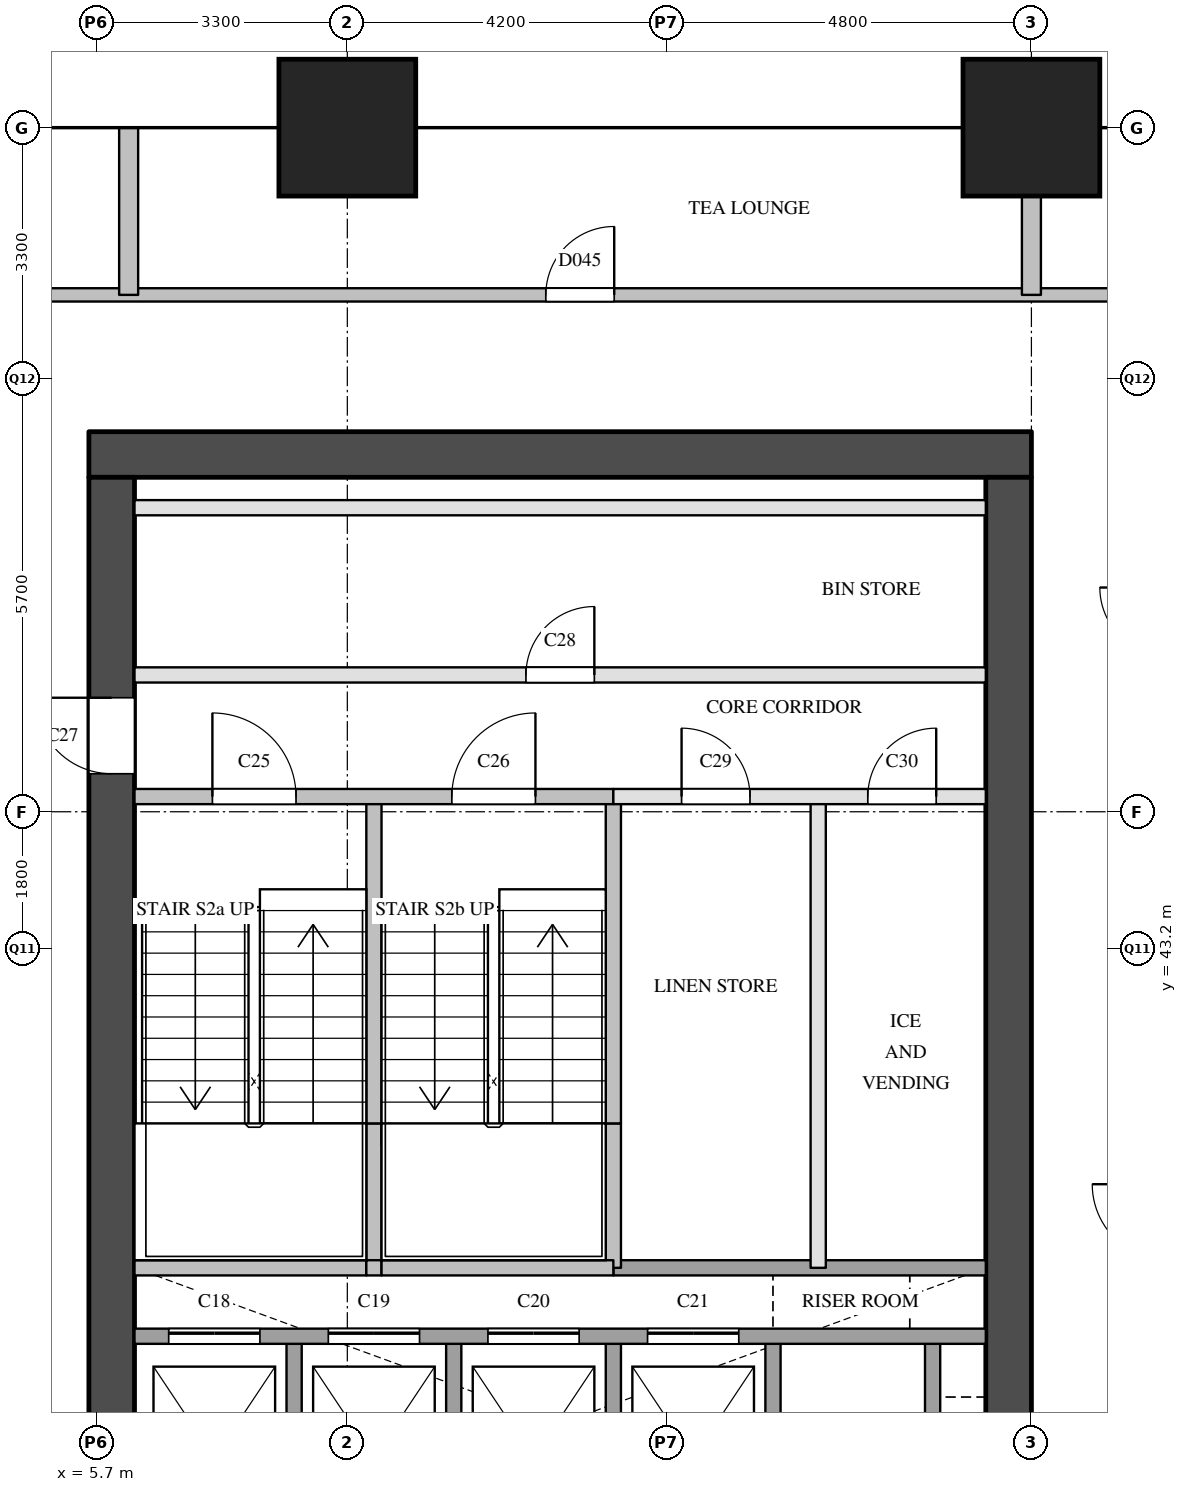
"""IFC4 building model, lengths in metres.
Left out: names, types, materials, properties, quantities, classifications, styles, units other than length and angle.
Written with IfcOpenShell. Run it as: python <this file> out.ifc"""

import sys

from ifc_helpers import new_model, si_unit, direction, frame, frame_2d, origin, origin_2d, place, context, subcontext, project, spatial, rectangle, extrude, element, fill, save


model = new_model("IFC4")
c1 = context("Model", 3, precision=1e-05, world=origin(), true_north=direction((0.0, 1.0)))
c2 = subcontext(c1, "Body", "Model", "MODEL_VIEW")
j1 = project(units=[si_unit("LENGTHUNIT", "METRE"), si_unit("PLANEANGLEUNIT", "RADIAN")], contexts=[c1])
p1 = place(None, origin())
s1 = spatial("IfcSite", under=j1, at=p1, CompositionType="ELEMENT")
p2 = place(p1, origin())
s2 = spatial("IfcBuilding", under=s1, at=p2, CompositionType="ELEMENT")
p3 = place(p2, frame((0.0, 0.0, 57.6)))
s3 = spatial("IfcBuildingStorey", under=s2, at=p3, CompositionType="ELEMENT", Elevation=57.6)
for number, where, z_axis, x_axis in (
    (1, (9.0, 54.0, 0.0), (0.0, 0.0, 1.0), (1.0, 0.0, 0.0)),
    (2, (18.0, 54.0, 0.0), (0.0, 0.0, 1.0), (1.0, 0.0, 0.0)),
):
    element("IfcColumn", number, at=place(p3, frame(where, z_axis=z_axis, x_axis=x_axis)), inside=s3, PredefinedType="COLUMN", context=c2, shape_type="SweptSolid", body=[
        extrude(rectangle(XDim=1.8, YDim=1.8, at=origin_2d()), origin(), (0.0, 0.0, 1.0), 3.8),
    ])
p4 = place(p3, frame((5.6, 49.7, 0.0), z_axis=(0.0, 0.0, 1.0), x_axis=(1.0, 0.0, 0.0)))
e3 = element("IfcWall", 3, at=p4, inside=s3, PredefinedType="SHEAR", context=c2, shape_type="SweptSolid", body=[
    extrude(rectangle(XDim=12.4, YDim=0.6, at=frame_2d((6.2, 0.0))), origin(), (0.0, 0.0, 1.0), 3.5),
])
p5 = place(p3, frame((5.9, 29.1, 0.0), z_axis=(0.0, 0.0, 1.0), x_axis=(0.0, 1.0, 0.0)))
e4 = element("IfcWall", 4, at=p5, inside=s3, PredefinedType="SHEAR", context=c2, shape_type="SweptSolid", body=[
    extrude(rectangle(XDim=20.3, YDim=0.6, at=frame_2d((10.15, 0.0))), origin(), (0.0, 0.0, 1.0), 3.5),
])
p6 = place(p5, frame((3.6, 0.0, 0.0)))
e5 = element("IfcOpeningElement", 5, at=p6, cuts=e4, PredefinedType="OPENING", context=c2, shape_type="SweptSolid", body=[
    extrude(rectangle(XDim=1.8, YDim=2.1, at=frame_2d((0.9, 1.05))), frame((0.0, 0.31, 0.0), z_axis=(0.0, -1.0, 0.0), x_axis=(1.0, 0.0, 0.0)), (0.0, 0.0, 1.0), 0.62),
])
p7 = place(p5, frame((16.4, 0.0, 0.0)))
e6 = element("IfcOpeningElement", 6, at=p7, cuts=e4, PredefinedType="OPENING", context=c2, shape_type="SweptSolid", body=[
    extrude(rectangle(XDim=1.0, YDim=2.1, at=frame_2d((0.5, 1.05))), frame((0.0, 0.31, 0.0), z_axis=(0.0, -1.0, 0.0), x_axis=(1.0, 0.0, 0.0)), (0.0, 0.0, 1.0), 0.62),
])
p8 = place(p3, frame((17.7, 29.1, 0.0), z_axis=(0.0, 0.0, 1.0), x_axis=(0.0, 1.0, 0.0)))
e7 = element("IfcWall", 7, at=p8, inside=s3, PredefinedType="SHEAR", context=c2, shape_type="SweptSolid", body=[
    extrude(rectangle(XDim=20.3, YDim=0.6, at=frame_2d((10.15, 0.0))), origin(), (0.0, 0.0, 1.0), 3.5),
])
p9 = place(p8, frame((1.25, 0.0, 0.0)))
e8 = element("IfcOpeningElement", 8, at=p9, cuts=e7, PredefinedType="OPENING", context=c2, shape_type="SweptSolid", body=[
    extrude(rectangle(XDim=0.7, YDim=2.1, at=frame_2d((0.35, 1.05))), frame((0.0, 0.31, 0.0), z_axis=(0.0, -1.0, 0.0), x_axis=(1.0, 0.0, 0.0)), (0.0, 0.0, 1.0), 0.62),
])
p10 = place(p8, frame((7.05, 0.0, 0.0)))
e9 = element("IfcOpeningElement", 9, at=p10, cuts=e7, PredefinedType="OPENING", context=c2, shape_type="SweptSolid", body=[
    extrude(rectangle(XDim=0.7, YDim=2.1, at=frame_2d((0.35, 1.05))), frame((0.0, 0.31, 0.0), z_axis=(0.0, -1.0, 0.0), x_axis=(1.0, 0.0, 0.0)), (0.0, 0.0, 1.0), 0.62),
])
p11 = place(p3, frame((8.3, 34.9, 0.0), z_axis=(0.0, 0.0, 1.0), x_axis=(0.0, 1.0, 0.0)))
e10 = element("IfcWall", 10, at=p11, inside=s3, PredefinedType="SOLIDWALL", context=c2, shape_type="SweptSolid", body=[
    extrude(rectangle(XDim=3.2, YDim=0.2, at=frame_2d((1.6, 0.0))), origin(), (0.0, 0.0, 1.0), 3.5),
])
p12 = place(p3, frame((9.35, 39.0, 0.0), z_axis=(0.0, 0.0, 1.0), x_axis=(0.0, 1.0, 0.0)))
e11 = element("IfcWall", 11, at=p12, inside=s3, PredefinedType="SOLIDWALL", context=c2, shape_type="SweptSolid", body=[
    extrude(rectangle(XDim=1.9, YDim=0.2, at=frame_2d((0.95, 0.0))), origin(), (0.0, 0.0, 1.0), 3.5),
])
p13 = place(p3, frame((9.35, 40.9, 0.0), z_axis=(0.0, 0.0, 1.0), x_axis=(0.0, 1.0, 0.0)))
e12 = element("IfcWall", 12, at=p13, inside=s3, PredefinedType="SOLIDWALL", context=c2, shape_type="SweptSolid", body=[
    extrude(rectangle(XDim=4.3, YDim=0.2, at=frame_2d((2.15, 0.0))), origin(), (0.0, 0.0, 1.0), 3.5),
])
for number, where, z_axis, x_axis in (
    (13, (10.4, 34.9, 0.0), (0.0, 0.0, 1.0), (0.0, 1.0, 0.0)),
    (14, (12.5, 34.9, 0.0), (0.0, 0.0, 1.0), (0.0, 1.0, 0.0)),
):
    element("IfcWall", number, at=place(p3, frame(where, z_axis=z_axis, x_axis=x_axis)), inside=s3, PredefinedType="SOLIDWALL", context=c2, shape_type="SweptSolid", body=[
        extrude(rectangle(XDim=3.2, YDim=0.2, at=frame_2d((1.6, 0.0))), origin(), (0.0, 0.0, 1.0), 3.5),
    ])
p14 = place(p3, frame((12.5, 39.0, 0.0), z_axis=(0.0, 0.0, 1.0), x_axis=(0.0, 1.0, 0.0)))
e15 = element("IfcWall", 15, at=p14, inside=s3, PredefinedType="SOLIDWALL", context=c2, shape_type="SweptSolid", body=[
    extrude(rectangle(XDim=1.9, YDim=0.2, at=frame_2d((0.95, 0.0))), origin(), (0.0, 0.0, 1.0), 3.5),
])
p15 = place(p3, frame((12.5, 40.9, 0.0), z_axis=(0.0, 0.0, 1.0), x_axis=(0.0, 1.0, 0.0)))
e16 = element("IfcWall", 16, at=p15, inside=s3, PredefinedType="SOLIDWALL", context=c2, shape_type="SweptSolid", body=[
    extrude(rectangle(XDim=4.3, YDim=0.2, at=frame_2d((2.15, 0.0))), origin(), (0.0, 0.0, 1.0), 3.5),
])
p16 = place(p3, frame((14.6, 34.9, 0.0), z_axis=(0.0, 0.0, 1.0), x_axis=(0.0, 1.0, 0.0)))
e17 = element("IfcWall", 17, at=p16, inside=s3, PredefinedType="SOLIDWALL", context=c2, shape_type="SweptSolid", body=[
    extrude(rectangle(XDim=3.2, YDim=0.2, at=frame_2d((1.6, 0.0))), origin(), (0.0, 0.0, 1.0), 3.5),
])
p17 = place(p3, frame((15.195, 39.0, 0.0), z_axis=(0.0, 0.0, 1.0), x_axis=(0.0, 1.0, 0.0)))
e18 = element("IfcWall", 18, at=p17, inside=s3, PredefinedType="PARTITIONING", context=c2, shape_type="SweptSolid", body=[
    extrude(rectangle(XDim=6.2, YDim=0.2, at=frame_2d((3.1, 0.0))), origin(), (0.0, 0.0, 1.0), 3.5),
])
p18 = place(p3, frame((16.7, 34.9, 0.0), z_axis=(0.0, 0.0, 1.0), x_axis=(0.0, 1.0, 0.0)))
e19 = element("IfcWall", 19, at=p18, inside=s3, PredefinedType="SOLIDWALL", context=c2, shape_type="SweptSolid", body=[
    extrude(rectangle(XDim=3.2, YDim=0.2, at=frame_2d((1.6, 0.0))), origin(), (0.0, 0.0, 1.0), 3.5),
])
p19 = place(p3, frame((6.2, 38.1, 0.0), z_axis=(0.0, 0.0, 1.0), x_axis=(1.0, 0.0, 0.0)))
e20 = element("IfcWall", 20, at=p19, inside=s3, PredefinedType="SOLIDWALL", context=c2, shape_type="SweptSolid", body=[
    extrude(rectangle(XDim=11.2, YDim=0.2, at=frame_2d((5.6, 0.0))), origin(), (0.0, 0.0, 1.0), 3.5),
])
p20 = place(p19, frame((0.45, 0.0, 0.0)))
e21 = element("IfcOpeningElement", 21, at=p20, cuts=e20, PredefinedType="OPENING", context=c2, shape_type="SweptSolid", body=[
    extrude(rectangle(XDim=1.2, YDim=2.1, at=frame_2d((0.6, 1.05))), frame((0.0, 0.11, 0.0), z_axis=(0.0, -1.0, 0.0), x_axis=(1.0, 0.0, 0.0)), (0.0, 0.0, 1.0), 0.22),
])
p21 = place(p19, frame((2.55, 0.0, 0.0)))
e22 = element("IfcOpeningElement", 22, at=p21, cuts=e20, PredefinedType="OPENING", context=c2, shape_type="SweptSolid", body=[
    extrude(rectangle(XDim=1.2, YDim=2.1, at=frame_2d((0.6, 1.05))), frame((0.0, 0.11, 0.0), z_axis=(0.0, -1.0, 0.0), x_axis=(1.0, 0.0, 0.0)), (0.0, 0.0, 1.0), 0.22),
])
p22 = place(p19, frame((4.65, 0.0, 0.0)))
e23 = element("IfcOpeningElement", 23, at=p22, cuts=e20, PredefinedType="OPENING", context=c2, shape_type="SweptSolid", body=[
    extrude(rectangle(XDim=1.2, YDim=2.1, at=frame_2d((0.6, 1.05))), frame((0.0, 0.11, 0.0), z_axis=(0.0, -1.0, 0.0), x_axis=(1.0, 0.0, 0.0)), (0.0, 0.0, 1.0), 0.22),
])
p23 = place(p19, frame((6.75, 0.0, 0.0)))
e24 = element("IfcOpeningElement", 24, at=p23, cuts=e20, PredefinedType="OPENING", context=c2, shape_type="SweptSolid", body=[
    extrude(rectangle(XDim=1.2, YDim=2.1, at=frame_2d((0.6, 1.05))), frame((0.0, 0.11, 0.0), z_axis=(0.0, -1.0, 0.0), x_axis=(1.0, 0.0, 0.0)), (0.0, 0.0, 1.0), 0.22),
])
p24 = place(p3, frame((12.5, 39.0, 0.0), z_axis=(0.0, 0.0, 1.0), x_axis=(1.0, 0.0, 0.0)))
e25 = element("IfcWall", 25, at=p24, inside=s3, PredefinedType="SOLIDWALL", context=c2, shape_type="SweptSolid", body=[
    extrude(rectangle(XDim=4.9, YDim=0.2, at=frame_2d((2.45, 0.0))), origin(), (0.0, 0.0, 1.0), 3.5),
])
p25 = place(p3, frame((6.2, 39.0, 0.0), z_axis=(0.0, 0.0, 1.0), x_axis=(1.0, 0.0, 0.0)))
e26 = element("IfcWall", 26, at=p25, inside=s3, PredefinedType="SOLIDWALL", context=c2, shape_type="SweptSolid", body=[
    extrude(rectangle(XDim=3.05, YDim=0.2, at=frame_2d((1.525, 0.0))), origin(), (0.0, 0.0, 1.0), 3.5),
])
p26 = place(p3, frame((9.25, 39.0, 0.0), z_axis=(0.0, 0.0, 1.0), x_axis=(1.0, 0.0, 0.0)))
e27 = element("IfcWall", 27, at=p26, inside=s3, PredefinedType="SOLIDWALL", context=c2, shape_type="SweptSolid", body=[
    extrude(rectangle(XDim=0.2, YDim=0.2, at=frame_2d((0.1, 0.0))), origin(), (0.0, 0.0, 1.0), 3.5),
])
p27 = place(p3, frame((9.45, 39.0, 0.0), z_axis=(0.0, 0.0, 1.0), x_axis=(1.0, 0.0, 0.0)))
e28 = element("IfcWall", 28, at=p27, inside=s3, PredefinedType="SOLIDWALL", context=c2, shape_type="SweptSolid", body=[
    extrude(rectangle(XDim=3.05, YDim=0.2, at=frame_2d((1.525, 0.0))), origin(), (0.0, 0.0, 1.0), 3.5),
])
p28 = place(p3, frame((12.5, 45.2, 0.0), z_axis=(0.0, 0.0, 1.0), x_axis=(1.0, 0.0, 0.0)))
e29 = element("IfcWall", 29, at=p28, inside=s3, PredefinedType="PARTITIONING", context=c2, shape_type="SweptSolid", body=[
    extrude(rectangle(XDim=4.9, YDim=0.2, at=frame_2d((2.45, 0.0))), origin(), (0.0, 0.0, 1.0), 3.5),
])
p29 = place(p28, frame((0.897, 0.0, 0.0)))
e30 = element("IfcOpeningElement", 30, at=p29, cuts=e29, PredefinedType="OPENING", context=c2, shape_type="SweptSolid", body=[
    extrude(rectangle(XDim=0.9, YDim=2.1, at=frame_2d((0.45, 1.05))), frame((0.0, 0.11, 0.0), z_axis=(0.0, -1.0, 0.0), x_axis=(1.0, 0.0, 0.0)), (0.0, 0.0, 1.0), 0.22),
])
p30 = place(p28, frame((3.347, 0.0, 0.0)))
e31 = element("IfcOpeningElement", 31, at=p30, cuts=e29, PredefinedType="OPENING", context=c2, shape_type="SweptSolid", body=[
    extrude(rectangle(XDim=0.9, YDim=2.1, at=frame_2d((0.45, 1.05))), frame((0.0, 0.11, 0.0), z_axis=(0.0, -1.0, 0.0), x_axis=(1.0, 0.0, 0.0)), (0.0, 0.0, 1.0), 0.22),
])
p31 = place(p3, frame((6.2, 45.2, 0.0), z_axis=(0.0, 0.0, 1.0), x_axis=(1.0, 0.0, 0.0)))
e32 = element("IfcWall", 32, at=p31, inside=s3, PredefinedType="SOLIDWALL", context=c2, shape_type="SweptSolid", body=[
    extrude(rectangle(XDim=6.3, YDim=0.2, at=frame_2d((3.15, 0.0))), origin(), (0.0, 0.0, 1.0), 3.5),
])
p32 = place(p31, frame((1.025, 0.0, 0.0)))
e33 = element("IfcOpeningElement", 33, at=p32, cuts=e32, PredefinedType="OPENING", context=c2, shape_type="SweptSolid", body=[
    extrude(rectangle(XDim=1.1, YDim=2.1, at=frame_2d((0.55, 1.05))), frame((0.0, 0.11, 0.0), z_axis=(0.0, -1.0, 0.0), x_axis=(1.0, 0.0, 0.0)), (0.0, 0.0, 1.0), 0.22),
])
p33 = place(p31, frame((4.175, 0.0, 0.0)))
e34 = element("IfcOpeningElement", 34, at=p33, cuts=e32, PredefinedType="OPENING", context=c2, shape_type="SweptSolid", body=[
    extrude(rectangle(XDim=1.1, YDim=2.1, at=frame_2d((0.55, 1.05))), frame((0.0, 0.11, 0.0), z_axis=(0.0, -1.0, 0.0), x_axis=(1.0, 0.0, 0.0)), (0.0, 0.0, 1.0), 0.22),
])
p34 = place(p3, frame((6.2, 46.8, 0.0), z_axis=(0.0, 0.0, 1.0), x_axis=(1.0, 0.0, 0.0)))
e35 = element("IfcWall", 35, at=p34, inside=s3, PredefinedType="PARTITIONING", context=c2, shape_type="SweptSolid", body=[
    extrude(rectangle(XDim=11.2, YDim=0.2, at=frame_2d((5.6, 0.0))), origin(), (0.0, 0.0, 1.0), 3.5),
])
p35 = place(p34, frame((5.15, 0.0, 0.0)))
e36 = element("IfcOpeningElement", 36, at=p35, cuts=e35, PredefinedType="OPENING", context=c2, shape_type="SweptSolid", body=[
    extrude(rectangle(XDim=0.9, YDim=2.1, at=frame_2d((0.45, 1.05))), frame((0.0, 0.11, 0.0), z_axis=(0.0, -1.0, 0.0), x_axis=(1.0, 0.0, 0.0)), (0.0, 0.0, 1.0), 0.22),
])
p36 = place(p3, frame((6.2, 49.0, 0.0), z_axis=(0.0, 0.0, 1.0), x_axis=(1.0, 0.0, 0.0)))
e37 = element("IfcWall", 37, at=p36, inside=s3, PredefinedType="PARTITIONING", context=c2, shape_type="SweptSolid", body=[
    extrude(rectangle(XDim=11.2, YDim=0.2, at=frame_2d((5.6, 0.0))), origin(), (0.0, 0.0, 1.0), 3.5),
])
p37 = place(p3, frame((3.8, 51.8, 0.0), z_axis=(0.0, 0.0, 1.0), x_axis=(1.0, 0.0, 0.0)))
e38 = element("IfcWall", 38, at=p37, inside=s3, PredefinedType="PARTITIONING", context=c2, shape_type="SweptSolid", body=[
    extrude(rectangle(XDim=16.0, YDim=0.175, at=frame_2d((8.0, 0.0))), origin(), (0.0, 0.0, 1.0), 3.5),
])
p38 = place(p37, frame((7.811, 0.0, 0.0)))
e39 = element("IfcOpeningElement", 39, at=p38, cuts=e38, PredefinedType="OPENING", context=c2, shape_type="SweptSolid", body=[
    extrude(rectangle(XDim=0.9, YDim=2.1, at=frame_2d((0.45, 1.05))), frame((0.0, 0.097, 0.0), z_axis=(0.0, -1.0, 0.0), x_axis=(1.0, 0.0, 0.0)), (0.0, 0.0, 1.0), 0.195),
])
p39 = place(p3, frame((6.123, 51.8, 0.0), z_axis=(0.0, 0.0, 1.0), x_axis=(0.0, 1.0, 0.0)))
e40 = element("IfcWall", 40, at=p39, inside=s3, PredefinedType="PARTITIONING", context=c2, shape_type="SweptSolid", body=[
    extrude(rectangle(XDim=2.2, YDim=0.25, at=frame_2d((1.1, 0.0))), origin(), (0.0, 0.0, 1.0), 2.5),
])
p40 = place(p3, frame((18.0, 51.8, 0.0), z_axis=(0.0, 0.0, 1.0), x_axis=(0.0, 1.0, 0.0)))
e41 = element("IfcWall", 41, at=p40, inside=s3, PredefinedType="PARTITIONING", context=c2, shape_type="SweptSolid", body=[
    extrude(rectangle(XDim=2.2, YDim=0.25, at=frame_2d((1.1, 0.0))), origin(), (0.0, 0.0, 1.0), 3.5),
])
p41 = place(p20, origin())
e42 = element("IfcDoor", 42, at=p41, inside=s3, OperationType="SLIDING_TO_LEFT", PredefinedType="DOOR", context=c2, shape_type="SweptSolid", body=[
    extrude(rectangle(XDim=1.2, YDim=2.1, at=frame_2d((0.6, 1.05))), frame((0.0, 0.025, 0.0), z_axis=(0.0, -1.0, 0.0), x_axis=(1.0, 0.0, 0.0)), (0.0, 0.0, 1.0), 0.05),
])
fill(e21, e42)
p42 = place(p21, origin())
e43 = element("IfcDoor", 43, at=p42, inside=s3, OperationType="SLIDING_TO_LEFT", PredefinedType="DOOR", context=c2, shape_type="SweptSolid", body=[
    extrude(rectangle(XDim=1.2, YDim=2.1, at=frame_2d((0.6, 1.05))), frame((0.0, 0.025, 0.0), z_axis=(0.0, -1.0, 0.0), x_axis=(1.0, 0.0, 0.0)), (0.0, 0.0, 1.0), 0.05),
])
fill(e22, e43)
p43 = place(p22, origin())
e44 = element("IfcDoor", 44, at=p43, inside=s3, OperationType="SLIDING_TO_LEFT", PredefinedType="DOOR", context=c2, shape_type="SweptSolid", body=[
    extrude(rectangle(XDim=1.2, YDim=2.1, at=frame_2d((0.6, 1.05))), frame((0.0, 0.025, 0.0), z_axis=(0.0, -1.0, 0.0), x_axis=(1.0, 0.0, 0.0)), (0.0, 0.0, 1.0), 0.05),
])
fill(e23, e44)
p44 = place(p23, origin())
e45 = element("IfcDoor", 45, at=p44, inside=s3, OperationType="SLIDING_TO_LEFT", PredefinedType="DOOR", context=c2, shape_type="SweptSolid", body=[
    extrude(rectangle(XDim=1.2, YDim=2.1, at=frame_2d((0.6, 1.05))), frame((0.0, 0.025, 0.0), z_axis=(0.0, -1.0, 0.0), x_axis=(1.0, 0.0, 0.0)), (0.0, 0.0, 1.0), 0.05),
])
fill(e24, e45)
p45 = place(p32, origin())
e46 = element("IfcDoor", 46, at=p45, inside=s3, OperationType="SINGLE_SWING_LEFT", PredefinedType="DOOR", context=c2, shape_type="SweptSolid", body=[
    extrude(rectangle(XDim=1.1, YDim=2.1, at=frame_2d((0.55, 1.05))), frame((0.0, 0.025, 0.0), z_axis=(0.0, -1.0, 0.0), x_axis=(1.0, 0.0, 0.0)), (0.0, 0.0, 1.0), 0.05),
])
fill(e33, e46)
p46 = place(p33, origin())
e47 = element("IfcDoor", 47, at=p46, inside=s3, OperationType="SINGLE_SWING_RIGHT", PredefinedType="DOOR", context=c2, shape_type="SweptSolid", body=[
    extrude(rectangle(XDim=1.1, YDim=2.1, at=frame_2d((0.55, 1.05))), frame((0.0, 0.025, 0.0), z_axis=(0.0, -1.0, 0.0), x_axis=(1.0, 0.0, 0.0)), (0.0, 0.0, 1.0), 0.05),
])
fill(e34, e47)
p47 = place(p7, origin())
e48 = element("IfcDoor", 48, at=p47, inside=s3, OperationType="SINGLE_SWING_RIGHT", PredefinedType="DOOR", context=c2, shape_type="SweptSolid", body=[
    extrude(rectangle(XDim=1.0, YDim=2.1, at=frame_2d((0.5, 1.05))), frame((0.0, 0.025, 0.0), z_axis=(0.0, -1.0, 0.0), x_axis=(1.0, 0.0, 0.0)), (0.0, 0.0, 1.0), 0.05),
])
fill(e6, e48)
p48 = place(p35, origin())
e49 = element("IfcDoor", 49, at=p48, inside=s3, OperationType="SINGLE_SWING_RIGHT", PredefinedType="DOOR", context=c2, shape_type="SweptSolid", body=[
    extrude(rectangle(XDim=0.9, YDim=2.1, at=frame_2d((0.45, 1.05))), frame((0.0, 0.025, 0.0), z_axis=(0.0, -1.0, 0.0), x_axis=(1.0, 0.0, 0.0)), (0.0, 0.0, 1.0), 0.05),
])
fill(e36, e49)
p49 = place(p29, origin())
e50 = element("IfcDoor", 50, at=p49, inside=s3, OperationType="SINGLE_SWING_LEFT", PredefinedType="DOOR", context=c2, shape_type="SweptSolid", body=[
    extrude(rectangle(XDim=0.9, YDim=2.1, at=frame_2d((0.45, 1.05))), frame((0.0, 0.025, 0.0), z_axis=(0.0, -1.0, 0.0), x_axis=(1.0, 0.0, 0.0)), (0.0, 0.0, 1.0), 0.05),
])
fill(e30, e50)
p50 = place(p30, origin())
e51 = element("IfcDoor", 51, at=p50, inside=s3, OperationType="SINGLE_SWING_RIGHT", PredefinedType="DOOR", context=c2, shape_type="SweptSolid", body=[
    extrude(rectangle(XDim=0.9, YDim=2.1, at=frame_2d((0.45, 1.05))), frame((0.0, 0.025, 0.0), z_axis=(0.0, -1.0, 0.0), x_axis=(1.0, 0.0, 0.0)), (0.0, 0.0, 1.0), 0.05),
])
fill(e31, e51)
p51 = place(p38, origin())
e52 = element("IfcDoor", 52, at=p51, inside=s3, OperationType="SINGLE_SWING_RIGHT", PredefinedType="DOOR", context=c2, shape_type="SweptSolid", body=[
    extrude(rectangle(XDim=0.9, YDim=2.1, at=frame_2d((0.45, 1.05))), frame((0.0, 0.025, 0.0), z_axis=(0.0, -1.0, 0.0), x_axis=(1.0, 0.0, 0.0)), (0.0, 0.0, 1.0), 0.05),
])
fill(e39, e52)
save(model, sys.argv[1])
